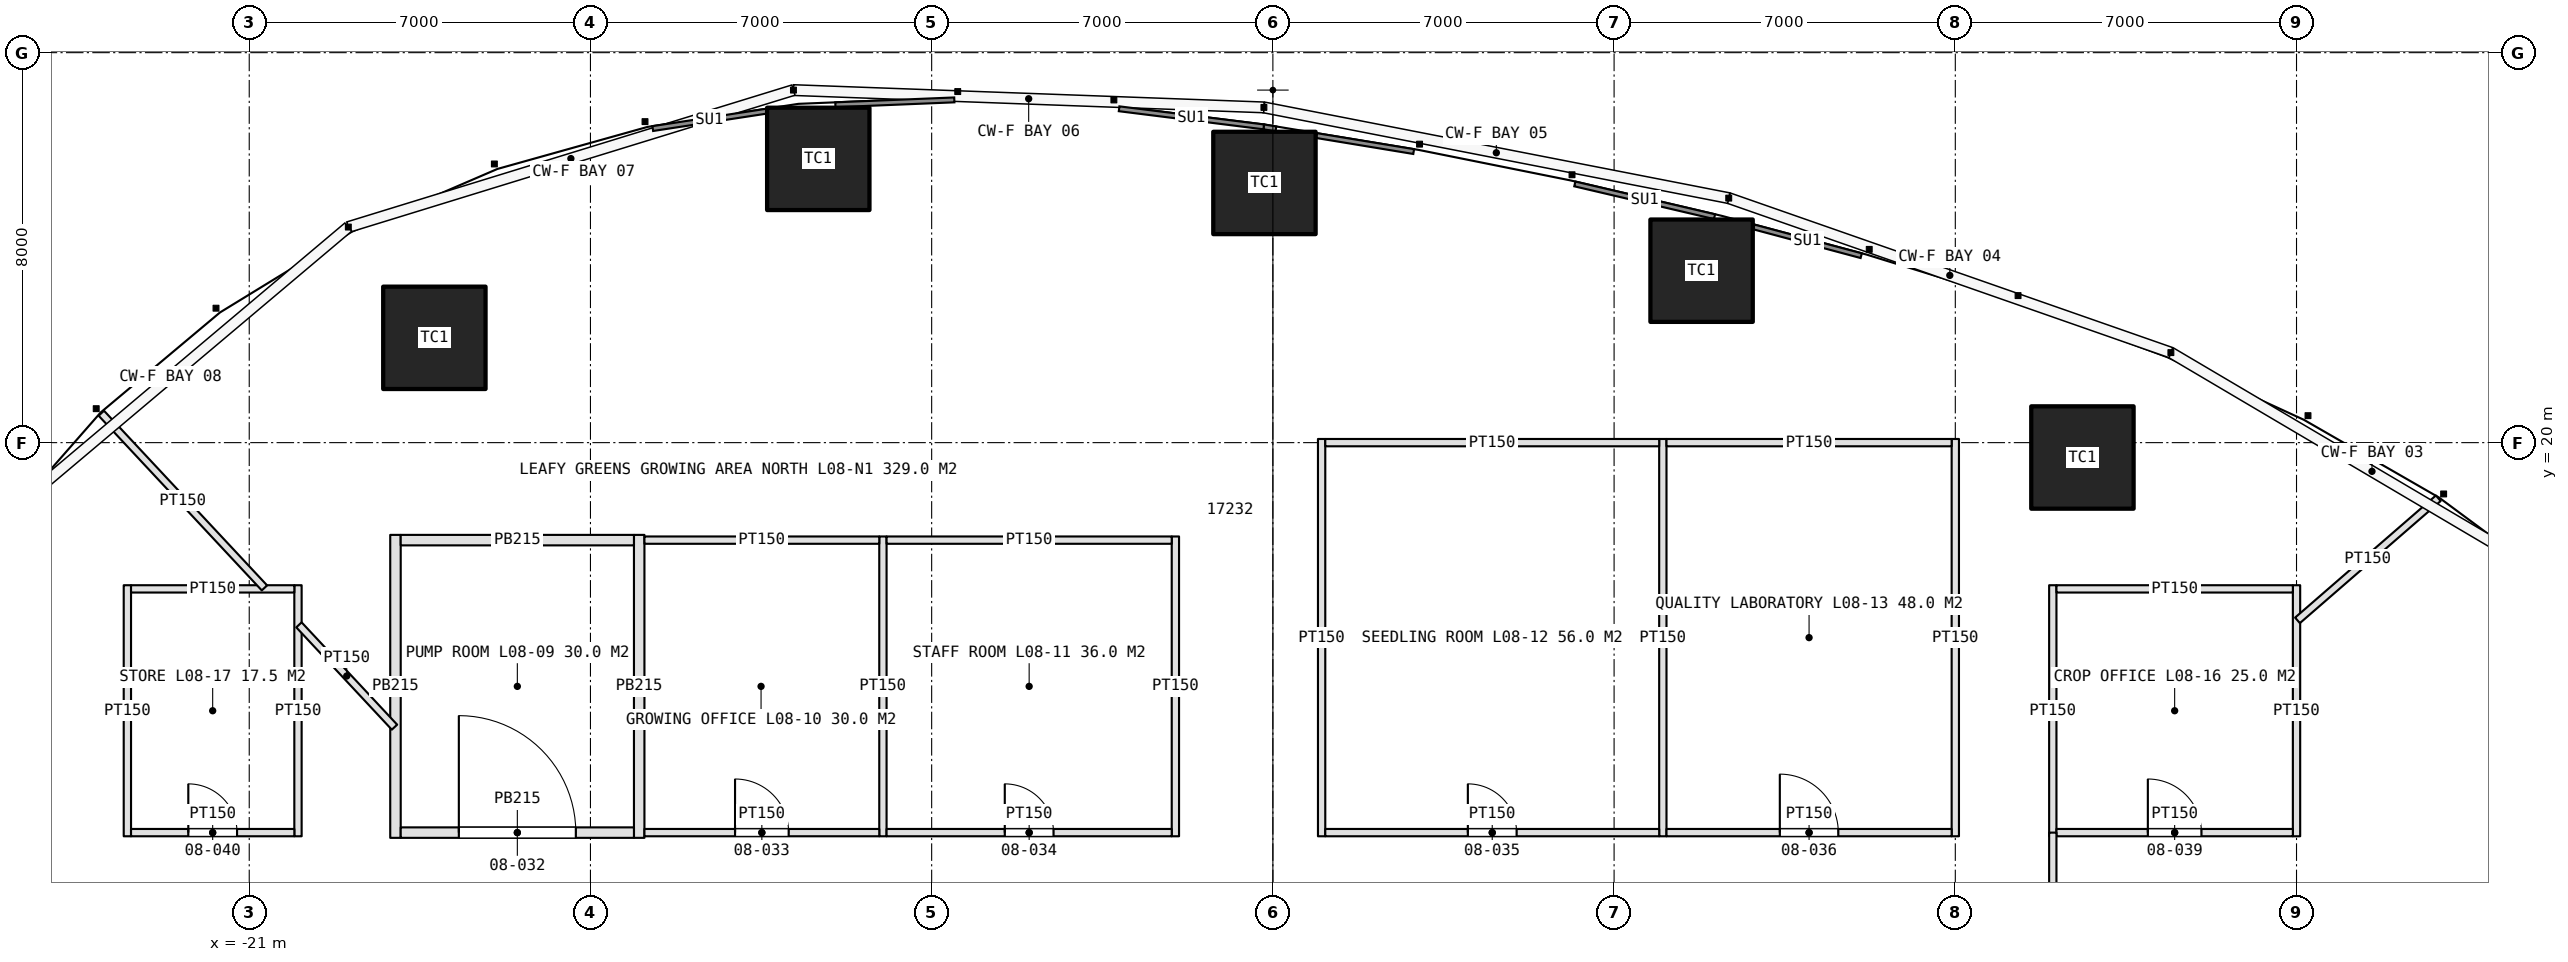
"""IFC4 building model, lengths in metres.
Left out: names, types, materials, properties, quantities, classifications, styles, units other than length and angle.
Written with IfcOpenShell. Run it as: python <this file> out.ifc"""

import sys

from ifc_helpers import new_model, si_unit, direction, frame, frame_2d, origin, origin_2d, place, context, subcontext, project, spatial, rectangle, extrude, element, fill, save


model = new_model("IFC4")
c1 = context("Model", 3, precision=1e-05, world=origin(), true_north=direction((0.0, 1.0)))
c2 = subcontext(c1, "Body", "Model", "MODEL_VIEW")
j1 = project(units=[si_unit("LENGTHUNIT", "METRE"), si_unit("PLANEANGLEUNIT", "RADIAN")], contexts=[c1])
p1 = place(None, origin())
s1 = spatial("IfcSite", under=j1, at=p1, CompositionType="ELEMENT")
p2 = place(p1, origin())
s2 = spatial("IfcBuilding", under=s1, at=p2, CompositionType="ELEMENT")
p3 = place(p2, frame((0.0, 0.0, 40.0)))
s3 = spatial("IfcBuildingStorey", under=s2, at=p3, CompositionType="ELEMENT", Elevation=40.0)
for number, where, z_axis, x_axis in (
    (1, (16.608, 19.695, 0.0), (0.0, 0.0, 1.0), (1.0, 0.0, 0.0)),
    (2, (8.795, 23.527, 0.0), (0.0, 0.0, 1.0), (1.0, 0.0, 0.0)),
    (3, (-0.173, 25.327, 0.0), (0.0, 0.0, 1.0), (1.0, 0.0, 0.0)),
    (4, (-9.326, 25.821, 0.0), (0.0, 0.0, 1.0), (1.0, 0.0, 0.0)),
    (5, (-17.202, 22.15, 0.0), (0.0, 0.0, 1.0), (1.0, 0.0, 0.0)),
):
    element("IfcColumn", number, at=place(p3, frame(where, z_axis=z_axis, x_axis=x_axis)), inside=s3, PredefinedType="COLUMN", context=c2, shape_type="SweptSolid", body=[
        extrude(rectangle(XDim=2.1, YDim=2.1, at=origin_2d()), origin(), (0.0, 0.0, 1.0), 5.0),
    ])
for number, where, z_axis, x_axis in (
    (6, (-18.0, 11.893, 0.0), (0.0, 0.0, 1.0), (0.0, 1.0, 0.0)),
    (7, (-13.0, 11.893, 0.0), (0.0, 0.0, 1.0), (0.0, 1.0, 0.0)),
):
    element("IfcWall", number, at=place(p3, frame(where, z_axis=z_axis, x_axis=x_axis)), inside=s3, PredefinedType="PARTITIONING", context=c2, shape_type="SweptSolid", body=[
        extrude(rectangle(XDim=6.215, YDim=0.215, at=frame_2d((3.107, 0.0))), origin(), (0.0, 0.0, 1.0), 3.6),
    ])
for number, where, z_axis, x_axis in (
    (8, (-8.0, 11.925, 0.0), (0.0, 0.0, 1.0), (0.0, 1.0, 0.0)),
    (9, (-2.0, 11.925, 0.0), (0.0, 0.0, 1.0), (0.0, 1.0, 0.0)),
):
    element("IfcWall", number, at=place(p3, frame(where, z_axis=z_axis, x_axis=x_axis)), inside=s3, PredefinedType="PARTITIONING", context=c2, shape_type="SweptSolid", body=[
        extrude(rectangle(XDim=6.15, YDim=0.15, at=frame_2d((3.075, 0.0))), origin(), (0.0, 0.0, 1.0), 3.6),
    ])
p4 = place(p3, frame((-17.893, 12.0, 0.0), z_axis=(0.0, 0.0, 1.0), x_axis=(1.0, 0.0, 0.0)))
e10 = element("IfcWall", 10, at=p4, inside=s3, PredefinedType="PARTITIONING", context=c2, shape_type="SweptSolid", body=[
    extrude(rectangle(XDim=4.785, YDim=0.215, at=frame_2d((2.393, 0.0))), origin(), (0.0, 0.0, 1.0), 3.6),
])
p5 = place(p4, frame((1.192, 0.0, 0.0)))
e11 = element("IfcOpeningElement", 11, at=p5, cuts=e10, PredefinedType="OPENING", context=c2, shape_type="SweptSolid", body=[
    extrude(rectangle(XDim=2.4, YDim=2.4, at=frame_2d((1.2, 1.2))), frame((0.0, 0.118, 0.0), z_axis=(0.0, -1.0, 0.0), x_axis=(1.0, 0.0, 0.0)), (0.0, 0.0, 1.0), 0.235),
])
p6 = place(p3, frame((-17.893, 18.0, 0.0), z_axis=(0.0, 0.0, 1.0), x_axis=(1.0, 0.0, 0.0)))
e12 = element("IfcWall", 12, at=p6, inside=s3, PredefinedType="PARTITIONING", context=c2, shape_type="SweptSolid", body=[
    extrude(rectangle(XDim=4.785, YDim=0.215, at=frame_2d((2.393, 0.0))), origin(), (0.0, 0.0, 1.0), 3.6),
])
p7 = place(p3, frame((-12.893, 12.0, 0.0), z_axis=(0.0, 0.0, 1.0), x_axis=(1.0, 0.0, 0.0)))
e13 = element("IfcWall", 13, at=p7, inside=s3, PredefinedType="PARTITIONING", context=c2, shape_type="SweptSolid", body=[
    extrude(rectangle(XDim=4.818, YDim=0.15, at=frame_2d((2.409, 0.0))), origin(), (0.0, 0.0, 1.0), 3.6),
])
p8 = place(p7, frame((1.859, 0.0, 0.0)))
e14 = element("IfcOpeningElement", 14, at=p8, cuts=e13, PredefinedType="OPENING", context=c2, shape_type="SweptSolid", body=[
    extrude(rectangle(XDim=1.1, YDim=2.3, at=frame_2d((0.55, 1.15))), frame((0.0, 0.085, 0.0), z_axis=(0.0, -1.0, 0.0), x_axis=(1.0, 0.0, 0.0)), (0.0, 0.0, 1.0), 0.17),
])
p9 = place(p3, frame((-12.893, 18.0, 0.0), z_axis=(0.0, 0.0, 1.0), x_axis=(1.0, 0.0, 0.0)))
e15 = element("IfcWall", 15, at=p9, inside=s3, PredefinedType="PARTITIONING", context=c2, shape_type="SweptSolid", body=[
    extrude(rectangle(XDim=4.818, YDim=0.15, at=frame_2d((2.409, 0.0))), origin(), (0.0, 0.0, 1.0), 3.6),
])
p10 = place(p3, frame((-7.925, 12.0, 0.0), z_axis=(0.0, 0.0, 1.0), x_axis=(1.0, 0.0, 0.0)))
e16 = element("IfcWall", 16, at=p10, inside=s3, PredefinedType="PARTITIONING", context=c2, shape_type="SweptSolid", body=[
    extrude(rectangle(XDim=5.85, YDim=0.15, at=frame_2d((2.925, 0.0))), origin(), (0.0, 0.0, 1.0), 3.6),
])
p11 = place(p10, frame((2.425, 0.0, 0.0)))
e17 = element("IfcOpeningElement", 17, at=p11, cuts=e16, PredefinedType="OPENING", context=c2, shape_type="SweptSolid", body=[
    extrude(rectangle(XDim=1.0, YDim=2.2, at=frame_2d((0.5, 1.1))), frame((0.0, 0.085, 0.0), z_axis=(0.0, -1.0, 0.0), x_axis=(1.0, 0.0, 0.0)), (0.0, 0.0, 1.0), 0.17),
])
p12 = place(p3, frame((-7.925, 18.0, 0.0), z_axis=(0.0, 0.0, 1.0), x_axis=(1.0, 0.0, 0.0)))
e18 = element("IfcWall", 18, at=p12, inside=s3, PredefinedType="PARTITIONING", context=c2, shape_type="SweptSolid", body=[
    extrude(rectangle(XDim=5.85, YDim=0.15, at=frame_2d((2.925, 0.0))), origin(), (0.0, 0.0, 1.0), 3.6),
])
for number, where, z_axis, x_axis in (
    (19, (1.0, 11.925, 0.0), (0.0, 0.0, 1.0), (0.0, 1.0, 0.0)),
    (20, (8.0, 11.925, 0.0), (0.0, 0.0, 1.0), (0.0, 1.0, 0.0)),
    (21, (14.0, 11.925, 0.0), (0.0, 0.0, 1.0), (0.0, 1.0, 0.0)),
):
    element("IfcWall", number, at=place(p3, frame(where, z_axis=z_axis, x_axis=x_axis)), inside=s3, PredefinedType="PARTITIONING", context=c2, shape_type="SweptSolid", body=[
        extrude(rectangle(XDim=8.15, YDim=0.15, at=frame_2d((4.075, 0.0))), origin(), (0.0, 0.0, 1.0), 3.6),
    ])
p13 = place(p3, frame((1.075, 12.0, 0.0), z_axis=(0.0, 0.0, 1.0), x_axis=(1.0, 0.0, 0.0)))
e22 = element("IfcWall", 22, at=p13, inside=s3, PredefinedType="PARTITIONING", context=c2, shape_type="SweptSolid", body=[
    extrude(rectangle(XDim=6.85, YDim=0.15, at=frame_2d((3.425, 0.0))), origin(), (0.0, 0.0, 1.0), 3.6),
])
p14 = place(p13, frame((2.925, 0.0, 0.0)))
e23 = element("IfcOpeningElement", 23, at=p14, cuts=e22, PredefinedType="OPENING", context=c2, shape_type="SweptSolid", body=[
    extrude(rectangle(XDim=1.0, YDim=2.2, at=frame_2d((0.5, 1.1))), frame((0.0, 0.085, 0.0), z_axis=(0.0, -1.0, 0.0), x_axis=(1.0, 0.0, 0.0)), (0.0, 0.0, 1.0), 0.17),
])
p15 = place(p3, frame((1.075, 20.0, 0.0), z_axis=(0.0, 0.0, 1.0), x_axis=(1.0, 0.0, 0.0)))
e24 = element("IfcWall", 24, at=p15, inside=s3, PredefinedType="PARTITIONING", context=c2, shape_type="SweptSolid", body=[
    extrude(rectangle(XDim=6.85, YDim=0.15, at=frame_2d((3.425, 0.0))), origin(), (0.0, 0.0, 1.0), 3.6),
])
p16 = place(p3, frame((8.075, 12.0, 0.0), z_axis=(0.0, 0.0, 1.0), x_axis=(1.0, 0.0, 0.0)))
e25 = element("IfcWall", 25, at=p16, inside=s3, PredefinedType="PARTITIONING", context=c2, shape_type="SweptSolid", body=[
    extrude(rectangle(XDim=5.85, YDim=0.15, at=frame_2d((2.925, 0.0))), origin(), (0.0, 0.0, 1.0), 3.6),
])
p17 = place(p16, frame((2.325, 0.0, 0.0)))
e26 = element("IfcOpeningElement", 26, at=p17, cuts=e25, PredefinedType="OPENING", context=c2, shape_type="SweptSolid", body=[
    extrude(rectangle(XDim=1.2, YDim=2.3, at=frame_2d((0.6, 1.15))), frame((0.0, 0.085, 0.0), z_axis=(0.0, -1.0, 0.0), x_axis=(1.0, 0.0, 0.0)), (0.0, 0.0, 1.0), 0.17),
])
p18 = place(p3, frame((8.075, 20.0, 0.0), z_axis=(0.0, 0.0, 1.0), x_axis=(1.0, 0.0, 0.0)))
e27 = element("IfcWall", 27, at=p18, inside=s3, PredefinedType="PARTITIONING", context=c2, shape_type="SweptSolid", body=[
    extrude(rectangle(XDim=5.85, YDim=0.15, at=frame_2d((2.925, 0.0))), origin(), (0.0, 0.0, 1.0), 3.6),
])
for number, where, z_axis, x_axis in (
    (28, (16.0, 11.925, 0.0), (0.0, 0.0, 1.0), (0.0, 1.0, 0.0)),
    (29, (21.0, 11.925, 0.0), (0.0, 0.0, 1.0), (0.0, 1.0, 0.0)),
):
    element("IfcWall", number, at=place(p3, frame(where, z_axis=z_axis, x_axis=x_axis)), inside=s3, PredefinedType="PARTITIONING", context=c2, shape_type="SweptSolid", body=[
        extrude(rectangle(XDim=5.15, YDim=0.15, at=frame_2d((2.575, 0.0))), origin(), (0.0, 0.0, 1.0), 3.6),
    ])
p19 = place(p3, frame((16.075, 12.0, 0.0), z_axis=(0.0, 0.0, 1.0), x_axis=(1.0, 0.0, 0.0)))
e30 = element("IfcWall", 30, at=p19, inside=s3, PredefinedType="PARTITIONING", context=c2, shape_type="SweptSolid", body=[
    extrude(rectangle(XDim=4.85, YDim=0.15, at=frame_2d((2.425, 0.0))), origin(), (0.0, 0.0, 1.0), 3.6),
])
p20 = place(p19, frame((1.875, 0.0, 0.0)))
e31 = element("IfcOpeningElement", 31, at=p20, cuts=e30, PredefinedType="OPENING", context=c2, shape_type="SweptSolid", body=[
    extrude(rectangle(XDim=1.1, YDim=2.3, at=frame_2d((0.55, 1.15))), frame((0.0, 0.085, 0.0), z_axis=(0.0, -1.0, 0.0), x_axis=(1.0, 0.0, 0.0)), (0.0, 0.0, 1.0), 0.17),
])
p21 = place(p3, frame((16.075, 17.0, 0.0), z_axis=(0.0, 0.0, 1.0), x_axis=(1.0, 0.0, 0.0)))
e32 = element("IfcWall", 32, at=p21, inside=s3, PredefinedType="PARTITIONING", context=c2, shape_type="SweptSolid", body=[
    extrude(rectangle(XDim=4.85, YDim=0.15, at=frame_2d((2.425, 0.0))), origin(), (0.0, 0.0, 1.0), 3.6),
])
for number, where, z_axis, x_axis in (
    (33, (-23.5, 11.925, 0.0), (0.0, 0.0, 1.0), (0.0, 1.0, 0.0)),
    (34, (-20.0, 11.925, 0.0), (0.0, 0.0, 1.0), (0.0, 1.0, 0.0)),
):
    element("IfcWall", number, at=place(p3, frame(where, z_axis=z_axis, x_axis=x_axis)), inside=s3, PredefinedType="PARTITIONING", context=c2, shape_type="SweptSolid", body=[
        extrude(rectangle(XDim=5.15, YDim=0.15, at=frame_2d((2.575, 0.0))), origin(), (0.0, 0.0, 1.0), 3.6),
    ])
p22 = place(p3, frame((-23.425, 12.0, 0.0), z_axis=(0.0, 0.0, 1.0), x_axis=(1.0, 0.0, 0.0)))
e35 = element("IfcWall", 35, at=p22, inside=s3, PredefinedType="PARTITIONING", context=c2, shape_type="SweptSolid", body=[
    extrude(rectangle(XDim=3.35, YDim=0.15, at=frame_2d((1.675, 0.0))), origin(), (0.0, 0.0, 1.0), 3.6),
])
p23 = place(p22, frame((1.175, 0.0, 0.0)))
e36 = element("IfcOpeningElement", 36, at=p23, cuts=e35, PredefinedType="OPENING", context=c2, shape_type="SweptSolid", body=[
    extrude(rectangle(XDim=1.0, YDim=2.2, at=frame_2d((0.5, 1.1))), frame((0.0, 0.085, 0.0), z_axis=(0.0, -1.0, 0.0), x_axis=(1.0, 0.0, 0.0)), (0.0, 0.0, 1.0), 0.17),
])
p24 = place(p3, frame((-23.425, 17.0, 0.0), z_axis=(0.0, 0.0, 1.0), x_axis=(1.0, 0.0, 0.0)))
e37 = element("IfcWall", 37, at=p24, inside=s3, PredefinedType="PARTITIONING", context=c2, shape_type="SweptSolid", body=[
    extrude(rectangle(XDim=3.35, YDim=0.15, at=frame_2d((1.675, 0.0))), origin(), (0.0, 0.0, 1.0), 3.6),
])
p25 = place(p3, frame((-20.688, 17.02, 0.0), z_axis=(0.0, 0.0, 1.0), x_axis=(-0.682520458914, 0.730866487919, 0.0)))
e38 = element("IfcWall", 38, at=p25, inside=s3, PredefinedType="PARTITIONING", context=c2, shape_type="SweptSolid", body=[
    extrude(rectangle(XDim=4.903, YDim=0.15, at=frame_2d((2.452, 0.0))), origin(), (0.0, 0.0, 1.0), 3.6),
])
p26 = place(p3, frame((-18.02, 14.163, 0.0), z_axis=(0.0, 0.0, 1.0), x_axis=(-0.682506029746, 0.730879962347, 0.0)))
e39 = element("IfcWall", 39, at=p26, inside=s3, PredefinedType="PARTITIONING", context=c2, shape_type="SweptSolid", body=[
    extrude(rectangle(XDim=2.872, YDim=0.15, at=frame_2d((1.436, 0.0))), origin(), (0.0, 0.0, 1.0), 3.6),
])
p27 = place(p3, frame((21.02, 16.354, 0.0), z_axis=(0.0, 0.0, 1.0), x_axis=(0.755425653008, 0.655234372402, 0.0)))
e40 = element("IfcWall", 40, at=p27, inside=s3, PredefinedType="PARTITIONING", context=c2, shape_type="SweptSolid", body=[
    extrude(rectangle(XDim=3.823, YDim=0.15, at=frame_2d((1.912, 0.0))), origin(), (0.0, 0.0, 1.0), 3.6),
])
p28 = place(p3, frame((16.0, 6.0, 0.0), z_axis=(0.0, 0.0, 1.0), x_axis=(0.0, 1.0, 0.0)))
e41 = element("IfcWall", 41, at=p28, inside=s3, PredefinedType="PARTITIONING", context=c2, shape_type="SweptSolid", body=[
    extrude(rectangle(XDim=6.0, YDim=0.15, at=frame_2d((3.0, 0.0))), origin(), (0.0, 0.0, 1.0), 3.6),
])
p29 = place(p28, frame((0.4, 0.0, 0.0)))
e42 = element("IfcOpeningElement", 42, at=p29, cuts=e41, PredefinedType="OPENING", context=c2, shape_type="SweptSolid", body=[
    extrude(rectangle(XDim=1.6, YDim=2.4, at=frame_2d((0.8, 1.2))), frame((0.0, 0.085, 0.0), z_axis=(0.0, -1.0, 0.0), x_axis=(1.0, 0.0, 0.0)), (0.0, 0.0, 1.0), 0.17),
])
p30 = place(p5, origin())
e43 = element("IfcDoor", 43, at=p30, inside=s3, OperationType="DOUBLE_DOOR_SINGLE_SWING", PredefinedType="DOOR", context=c2, shape_type="SweptSolid", body=[
    extrude(rectangle(XDim=2.4, YDim=2.4, at=frame_2d((1.2, 1.2))), frame((0.0, 0.025, 0.0), z_axis=(0.0, -1.0, 0.0), x_axis=(1.0, 0.0, 0.0)), (0.0, 0.0, 1.0), 0.05),
])
fill(e11, e43)
p31 = place(p8, origin())
e44 = element("IfcDoor", 44, at=p31, inside=s3, OperationType="SINGLE_SWING_LEFT", PredefinedType="DOOR", context=c2, shape_type="SweptSolid", body=[
    extrude(rectangle(XDim=1.1, YDim=2.3, at=frame_2d((0.55, 1.15))), frame((0.0, 0.025, 0.0), z_axis=(0.0, -1.0, 0.0), x_axis=(1.0, 0.0, 0.0)), (0.0, 0.0, 1.0), 0.05),
])
fill(e14, e44)
p32 = place(p11, origin())
e45 = element("IfcDoor", 45, at=p32, inside=s3, OperationType="SINGLE_SWING_LEFT", PredefinedType="DOOR", context=c2, shape_type="SweptSolid", body=[
    extrude(rectangle(XDim=1.0, YDim=2.2, at=frame_2d((0.5, 1.1))), frame((0.0, 0.025, 0.0), z_axis=(0.0, -1.0, 0.0), x_axis=(1.0, 0.0, 0.0)), (0.0, 0.0, 1.0), 0.05),
])
fill(e17, e45)
p33 = place(p14, origin())
e46 = element("IfcDoor", 46, at=p33, inside=s3, OperationType="SINGLE_SWING_LEFT", PredefinedType="DOOR", context=c2, shape_type="SweptSolid", body=[
    extrude(rectangle(XDim=1.0, YDim=2.2, at=frame_2d((0.5, 1.1))), frame((0.0, 0.025, 0.0), z_axis=(0.0, -1.0, 0.0), x_axis=(1.0, 0.0, 0.0)), (0.0, 0.0, 1.0), 0.05),
])
fill(e23, e46)
p34 = place(p17, origin())
e47 = element("IfcDoor", 47, at=p34, inside=s3, OperationType="SINGLE_SWING_LEFT", PredefinedType="DOOR", context=c2, shape_type="SweptSolid", body=[
    extrude(rectangle(XDim=1.2, YDim=2.3, at=frame_2d((0.6, 1.15))), frame((0.0, 0.025, 0.0), z_axis=(0.0, -1.0, 0.0), x_axis=(1.0, 0.0, 0.0)), (0.0, 0.0, 1.0), 0.05),
])
fill(e26, e47)
p35 = place(p20, origin())
e48 = element("IfcDoor", 48, at=p35, inside=s3, OperationType="SINGLE_SWING_LEFT", PredefinedType="DOOR", context=c2, shape_type="SweptSolid", body=[
    extrude(rectangle(XDim=1.1, YDim=2.3, at=frame_2d((0.55, 1.15))), frame((0.0, 0.025, 0.0), z_axis=(0.0, -1.0, 0.0), x_axis=(1.0, 0.0, 0.0)), (0.0, 0.0, 1.0), 0.05),
])
fill(e31, e48)
p36 = place(p23, origin())
e49 = element("IfcDoor", 49, at=p36, inside=s3, OperationType="SINGLE_SWING_LEFT", PredefinedType="DOOR", context=c2, shape_type="SweptSolid", body=[
    extrude(rectangle(XDim=1.0, YDim=2.2, at=frame_2d((0.5, 1.1))), frame((0.0, 0.025, 0.0), z_axis=(0.0, -1.0, 0.0), x_axis=(1.0, 0.0, 0.0)), (0.0, 0.0, 1.0), 0.05),
])
fill(e36, e49)
save(model, sys.argv[1])
